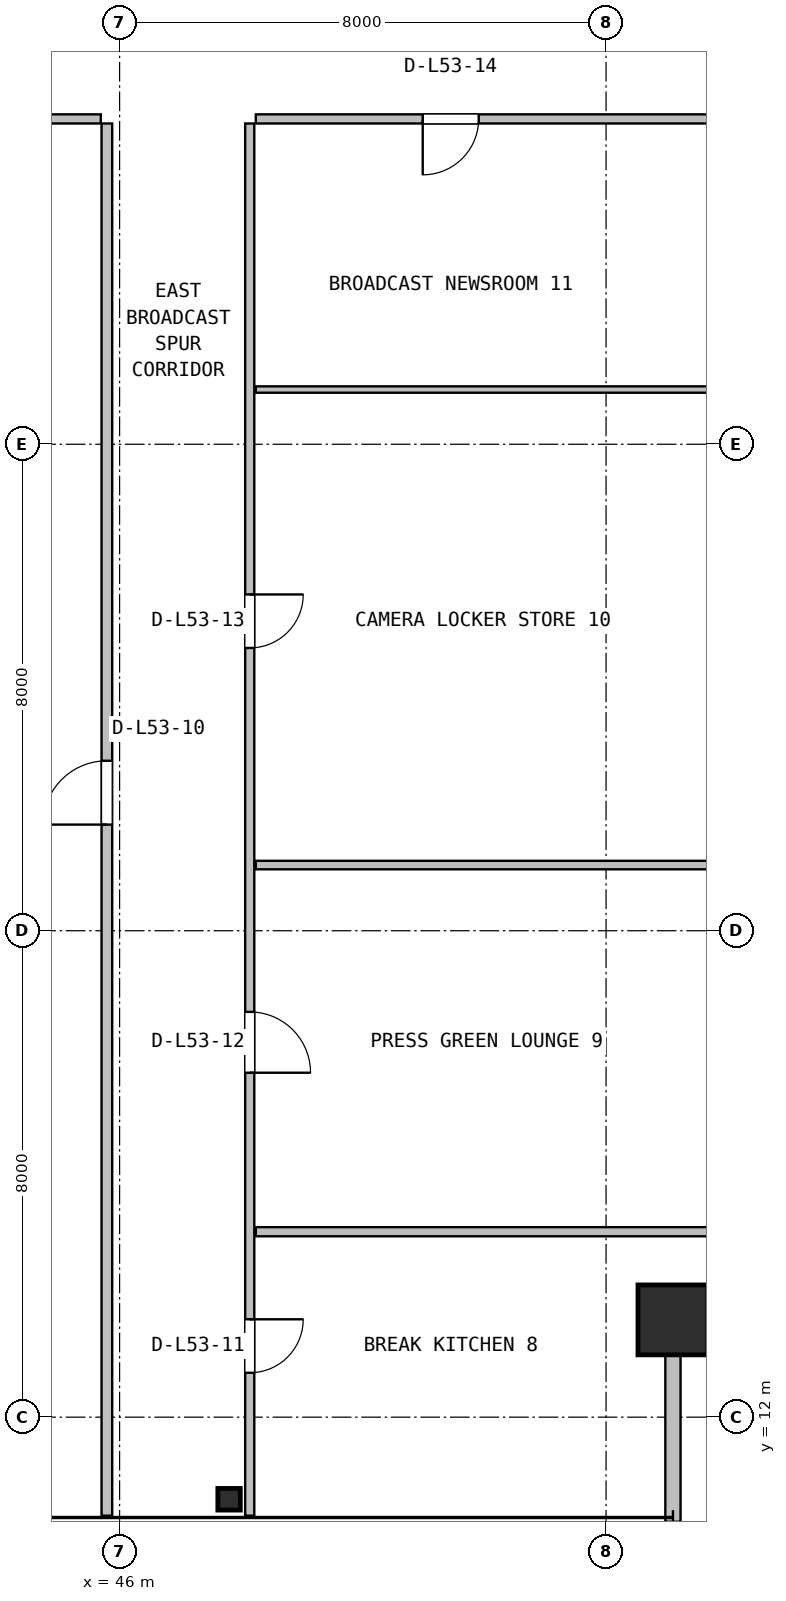
"""IFC4 building model, lengths in metres.
Left out: names, types, materials, properties, quantities, classifications, styles, units other than length and angle.
Written with IfcOpenShell. Run it as: python <this file> out.ifc"""

import sys

from ifc_helpers import new_model, si_unit, direction, frame, frame_2d, origin, origin_2d, place, context, subcontext, project, spatial, rectangle, hollow_rectangle, i_section, extrude, source, transform, mapped, element, fill, save


model = new_model("IFC4")
c1 = context("Model", 3, precision=1e-05, world=origin(), true_north=direction((0.0, 1.0)))
c2 = subcontext(c1, "Body", "Model", "MODEL_VIEW")
j1 = project(units=[si_unit("LENGTHUNIT", "METRE"), si_unit("PLANEANGLEUNIT", "RADIAN")], contexts=[c1])
p1 = place(None, origin())
s1 = spatial("IfcSite", under=j1, at=p1, CompositionType="ELEMENT")
p2 = place(p1, origin())
s2 = spatial("IfcBuilding", under=s1, at=p2, CompositionType="ELEMENT")
p3 = place(p2, frame((0.0, 0.0, 215.0)))
s3 = spatial("IfcBuildingStorey", under=s2, at=p3, CompositionType="ELEMENT", Elevation=215.0)
m1 = source(origin(), c2, "Body", "SweptSolid", [
    extrude(hollow_rectangle(XDim=1.15, YDim=1.15, WallThickness=0.045, at=origin_2d()), origin(), (0.0, 0.0, 1.0), 3.8),
])
p4 = place(p3, frame((55.1, 13.6, 0.0), z_axis=(0.0, 0.0, 1.0), x_axis=(1.0, 0.0, 0.0)))
e1 = element("IfcColumn", 1, at=p4, inside=s3, PredefinedType="COLUMN", context=c2, shape_type="MappedRepresentation", body=[
    mapped(m1, transform((0.0, 0.0, 0.0), x_axis=(1.0, 0.0, 0.0), y_axis=(0.0, 1.0, 0.0), z_axis=(0.0, 0.0, 1.0), scale=1.0)),
])
m2 = source(origin(), c2, "Body", "SweptSolid", [
    extrude(i_section(OverallWidth=0.369, OverallDepth=0.356, WebThickness=0.011, FlangeThickness=0.018, FilletRadius=0.016, at=origin_2d()), origin(), (0.0, 0.0, 1.0), 3.8),
])
p5 = place(p3, frame((47.8, 10.65, 0.0), z_axis=(0.0, 0.0, 1.0), x_axis=(1.0, 0.0, 0.0)))
e2 = element("IfcColumn", 2, at=p5, inside=s3, PredefinedType="COLUMN", context=c2, shape_type="MappedRepresentation", body=[
    mapped(m2, transform((0.0, 0.0, 0.0), x_axis=(1.0, 0.0, 0.0), y_axis=(0.0, 1.0, 0.0), z_axis=(0.0, 0.0, 1.0), scale=1.0)),
])
p6 = place(p3, frame((55.1, 10.28, 0.0), z_axis=(0.0, 0.0, 1.0), x_axis=(0.0, 1.0, 0.0)))
e3 = element("IfcWall", 3, at=p6, inside=s3, PredefinedType="SOLIDWALL", context=c2, shape_type="SweptSolid", body=[
    extrude(rectangle(XDim=3.4, YDim=0.25, at=frame_2d((1.7, 0.0))), origin(), (0.0, 0.0, 1.0), 3.171),
])
p7 = place(p3, frame((22.9, 33.35, 0.0), z_axis=(0.0, 0.0, 1.0), x_axis=(1.0, 0.0, 0.0)))
e4 = element("IfcWall", 4, at=p7, inside=s3, PredefinedType="PARTITIONING", context=c2, shape_type="SweptSolid", body=[
    extrude(rectangle(XDim=22.79, YDim=0.15, at=frame_2d((11.395, 0.0))), origin(), (0.0, 0.0, 1.0), 2.908),
])
p8 = place(p7, frame((8.84, 0.0, 0.0)))
e5 = element("IfcOpeningElement", 5, at=p8, cuts=e4, PredefinedType="OPENING", context=c2, shape_type="SweptSolid", body=[
    extrude(rectangle(XDim=0.92, YDim=2.08, at=frame_2d((0.46, 1.04))), frame((0.0, 0.085, 0.0), z_axis=(0.0, -1.0, 0.0), x_axis=(1.0, 0.0, 0.0)), (0.0, 0.0, 1.0), 0.17),
])
p9 = place(p3, frame((45.79, 10.38, 0.0), z_axis=(0.0, 0.0, 1.0), x_axis=(0.0, 1.0, 0.0)))
e6 = element("IfcWall", 6, at=p9, inside=s3, PredefinedType="PARTITIONING", context=c2, shape_type="SweptSolid", body=[
    extrude(rectangle(XDim=22.895, YDim=0.175, at=frame_2d((11.448, 0.0))), origin(), (0.0, 0.0, 1.0), 2.908),
])
p10 = place(p9, frame((11.365, 0.0, 0.0)))
e7 = element("IfcOpeningElement", 7, at=p10, cuts=e6, PredefinedType="OPENING", context=c2, shape_type="SweptSolid", body=[
    extrude(rectangle(XDim=1.05, YDim=2.1, at=frame_2d((0.525, 1.05))), frame((0.0, 0.098, 0.0), z_axis=(0.0, -1.0, 0.0), x_axis=(1.0, 0.0, 0.0)), (0.0, 0.0, 1.0), 0.195),
])
p11 = place(p3, frame((48.24, 15.05, 0.0), z_axis=(0.0, 0.0, 1.0), x_axis=(1.0, 0.0, 0.0)))
e8 = element("IfcWall", 8, at=p11, inside=s3, PredefinedType="PARTITIONING", context=c2, shape_type="SweptSolid", body=[
    extrude(rectangle(XDim=10.08, YDim=0.15, at=frame_2d((5.04, 0.0))), origin(), (0.0, 0.0, 1.0), 3.171),
])
p12 = place(p3, frame((48.14, 10.38, 0.0), z_axis=(0.0, 0.0, 1.0), x_axis=(0.0, 1.0, 0.0)))
e9 = element("IfcWall", 9, at=p12, inside=s3, PredefinedType="PARTITIONING", context=c2, shape_type="SweptSolid", body=[
    extrude(rectangle(XDim=22.895, YDim=0.15, at=frame_2d((11.448, 0.0))), origin(), (0.0, 0.0, 1.0), 3.171),
])
p13 = place(p12, frame((2.35, 0.0, 0.0)))
e10 = element("IfcOpeningElement", 10, at=p13, cuts=e9, PredefinedType="OPENING", context=c2, shape_type="SweptSolid", body=[
    extrude(rectangle(XDim=0.88, YDim=2.06, at=frame_2d((0.44, 1.03))), frame((0.0, 0.085, 0.0), z_axis=(0.0, -1.0, 0.0), x_axis=(1.0, 0.0, 0.0)), (0.0, 0.0, 1.0), 0.17),
])
p14 = place(p12, frame((7.285, 0.0, 0.0)))
e11 = element("IfcOpeningElement", 11, at=p14, cuts=e9, PredefinedType="OPENING", context=c2, shape_type="SweptSolid", body=[
    extrude(rectangle(XDim=1.0, YDim=2.1, at=frame_2d((0.5, 1.05))), frame((0.0, 0.085, 0.0), z_axis=(0.0, -1.0, 0.0), x_axis=(1.0, 0.0, 0.0)), (0.0, 0.0, 1.0), 0.17),
])
p15 = place(p12, frame((14.27, 0.0, 0.0)))
e12 = element("IfcOpeningElement", 12, at=p15, cuts=e9, PredefinedType="OPENING", context=c2, shape_type="SweptSolid", body=[
    extrude(rectangle(XDim=0.88, YDim=2.06, at=frame_2d((0.44, 1.03))), frame((0.0, 0.085, 0.0), z_axis=(0.0, -1.0, 0.0), x_axis=(1.0, 0.0, 0.0)), (0.0, 0.0, 1.0), 0.17),
])
p16 = place(p3, frame((48.24, 21.08, 0.0), z_axis=(0.0, 0.0, 1.0), x_axis=(1.0, 0.0, 0.0)))
e13 = element("IfcWall", 13, at=p16, inside=s3, PredefinedType="PARTITIONING", context=c2, shape_type="SweptSolid", body=[
    extrude(rectangle(XDim=10.08, YDim=0.14, at=frame_2d((5.04, 0.0))), origin(), (0.0, 0.0, 1.0), 3.171),
])
p17 = place(p3, frame((48.24, 28.9, 0.0), z_axis=(0.0, 0.0, 1.0), x_axis=(1.0, 0.0, 0.0)))
e14 = element("IfcWall", 14, at=p17, inside=s3, PredefinedType="PARTITIONING", context=c2, shape_type="SweptSolid", body=[
    extrude(rectangle(XDim=10.08, YDim=0.105, at=frame_2d((5.04, 0.0))), origin(), (0.0, 0.0, 1.0), 3.171),
])
p18 = place(p3, frame((48.24, 33.35, 0.0), z_axis=(0.0, 0.0, 1.0), x_axis=(1.0, 0.0, 0.0)))
e15 = element("IfcWall", 15, at=p18, inside=s3, PredefinedType="PARTITIONING", context=c2, shape_type="SweptSolid", body=[
    extrude(rectangle(XDim=10.08, YDim=0.15, at=frame_2d((5.04, 0.0))), origin(), (0.0, 0.0, 1.0), 3.171),
])
p19 = place(p18, frame((2.745, 0.0, 0.0)))
e16 = element("IfcOpeningElement", 16, at=p19, cuts=e15, PredefinedType="OPENING", context=c2, shape_type="SweptSolid", body=[
    extrude(rectangle(XDim=0.92, YDim=2.08, at=frame_2d((0.46, 1.04))), frame((0.0, 0.085, 0.0), z_axis=(0.0, -1.0, 0.0), x_axis=(1.0, 0.0, 0.0)), (0.0, 0.0, 1.0), 0.17),
])
m3 = source(origin(), c2, "Body", "SweptSolid", [
    extrude(rectangle(XDim=1.05, YDim=2.1, at=frame_2d((0.525, 1.05))), frame((0.0, 0.025, 0.0), z_axis=(0.0, -1.0, 0.0), x_axis=(1.0, 0.0, 0.0)), (0.0, 0.0, 1.0), 0.05),
])
p20 = place(p10, origin())
e17 = element("IfcDoor", 17, at=p20, inside=s3, OperationType="SINGLE_SWING_LEFT", PredefinedType="DOOR", context=c2, shape_type="MappedRepresentation", body=[
    mapped(m3, transform((0.0, 0.0, 0.0), x_axis=(1.0, 0.0, 0.0), y_axis=(0.0, 1.0, 0.0), z_axis=(0.0, 0.0, 1.0), scale=1.0)),
])
fill(e7, e17)
m4 = source(origin(), c2, "Body", "SweptSolid", [
    extrude(rectangle(XDim=0.88, YDim=2.06, at=frame_2d((0.44, 1.03))), frame((0.0, 0.025, 0.0), z_axis=(0.0, -1.0, 0.0), x_axis=(1.0, 0.0, 0.0)), (0.0, 0.0, 1.0), 0.05),
])
p21 = place(p13, frame((0.88, 0.0, 0.0), z_axis=(0.0, 0.0, 1.0), x_axis=(-1.0, 0.0, 0.0)))
e18 = element("IfcDoor", 18, at=p21, inside=s3, OperationType="SINGLE_SWING_RIGHT", PredefinedType="DOOR", context=c2, shape_type="MappedRepresentation", body=[
    mapped(m4, transform((0.0, 0.0, 0.0), x_axis=(1.0, 0.0, 0.0), y_axis=(0.0, 1.0, 0.0), z_axis=(0.0, 0.0, 1.0), scale=1.0)),
])
fill(e10, e18)
m5 = source(origin(), c2, "Body", "SweptSolid", [
    extrude(rectangle(XDim=1.0, YDim=2.1, at=frame_2d((0.5, 1.05))), frame((0.0, 0.025, 0.0), z_axis=(0.0, -1.0, 0.0), x_axis=(1.0, 0.0, 0.0)), (0.0, 0.0, 1.0), 0.05),
])
p22 = place(p14, frame((1.0, 0.0, 0.0), z_axis=(0.0, 0.0, 1.0), x_axis=(-1.0, 0.0, 0.0)))
e19 = element("IfcDoor", 19, at=p22, inside=s3, OperationType="SINGLE_SWING_LEFT", PredefinedType="DOOR", context=c2, shape_type="MappedRepresentation", body=[
    mapped(m5, transform((0.0, 0.0, 0.0), x_axis=(1.0, 0.0, 0.0), y_axis=(0.0, 1.0, 0.0), z_axis=(0.0, 0.0, 1.0), scale=1.0)),
])
fill(e11, e19)
p23 = place(p15, frame((0.88, 0.0, 0.0), z_axis=(0.0, 0.0, 1.0), x_axis=(-1.0, 0.0, 0.0)))
e20 = element("IfcDoor", 20, at=p23, inside=s3, OperationType="SINGLE_SWING_RIGHT", PredefinedType="DOOR", context=c2, shape_type="MappedRepresentation", body=[
    mapped(m4, transform((0.0, 0.0, 0.0), x_axis=(1.0, 0.0, 0.0), y_axis=(0.0, 1.0, 0.0), z_axis=(0.0, 0.0, 1.0), scale=1.0)),
])
fill(e12, e20)
m6 = source(origin(), c2, "Body", "SweptSolid", [
    extrude(rectangle(XDim=0.92, YDim=2.08, at=frame_2d((0.46, 1.04))), frame((0.0, 0.025, 0.0), z_axis=(0.0, -1.0, 0.0), x_axis=(1.0, 0.0, 0.0)), (0.0, 0.0, 1.0), 0.05),
])
p24 = place(p19, frame((0.92, 0.0, 0.0), z_axis=(0.0, 0.0, 1.0), x_axis=(-1.0, 0.0, 0.0)))
e21 = element("IfcDoor", 21, at=p24, inside=s3, OperationType="SINGLE_SWING_LEFT", PredefinedType="DOOR", context=c2, shape_type="MappedRepresentation", body=[
    mapped(m6, transform((0.0, 0.0, 0.0), x_axis=(1.0, 0.0, 0.0), y_axis=(0.0, 1.0, 0.0), z_axis=(0.0, 0.0, 1.0), scale=1.0)),
])
fill(e16, e21)
save(model, sys.argv[1])
